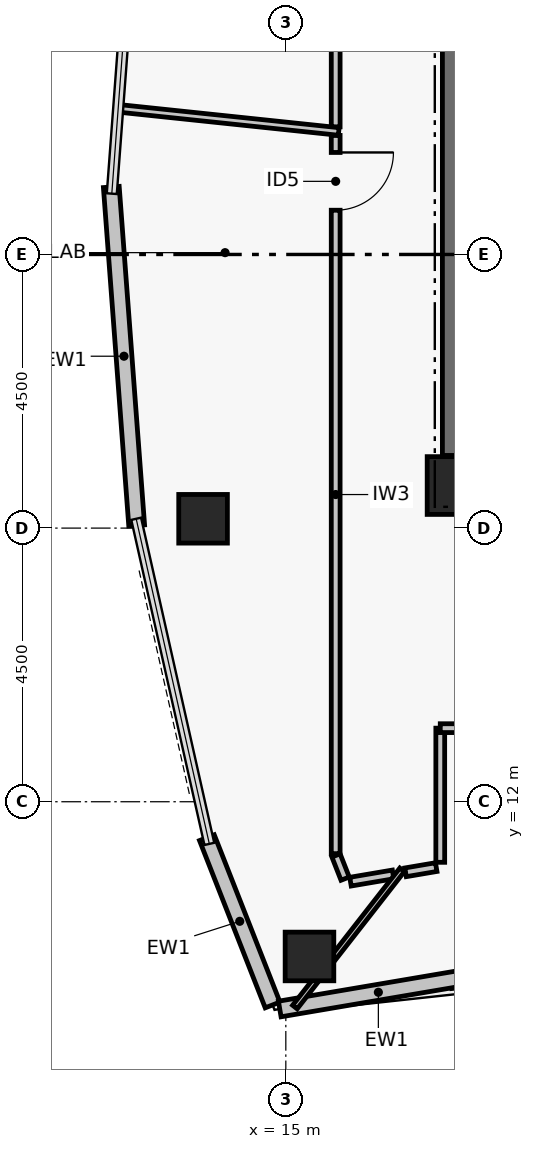
"""IFC4 building model, lengths in metres.
Left out: names, types, materials, properties, quantities, classifications, styles, units other than length and angle.
Written with IfcOpenShell. Run it as: python <this file> out.ifc"""

import sys

from ifc_helpers import new_model, si_unit, direction, frame, frame_2d, origin, origin_2d, place, context, subcontext, project, spatial, rectangle, hollow_rectangle, extrude, element, fill, save


model = new_model("IFC4")
c1 = context("Model", 3, precision=1e-05, world=origin(), true_north=direction((0.0, 1.0)))
c2 = subcontext(c1, "Body", "Model", "MODEL_VIEW")
j1 = project(units=[si_unit("LENGTHUNIT", "METRE"), si_unit("PLANEANGLEUNIT", "RADIAN")], contexts=[c1])
p1 = place(None, origin())
s1 = spatial("IfcSite", under=j1, at=p1, CompositionType="ELEMENT")
p2 = place(p1, origin())
s2 = spatial("IfcBuilding", under=s1, at=p2, CompositionType="ELEMENT")
p3 = place(p2, frame((0.0, 0.0, 247.14)))
s3 = spatial("IfcBuildingStorey", under=s2, at=p3, CompositionType="ELEMENT", Elevation=247.14)
p4 = place(p3, frame((17.8, 17.2, 0.0), z_axis=(0.0, 0.0, 1.0), x_axis=(1.0, 0.0, 0.0)))
e1 = element("IfcColumn", 1, at=p4, inside=s3, PredefinedType="COLUMN", context=c2, shape_type="SweptSolid", body=[
    extrude(rectangle(XDim=0.95, YDim=0.95, at=origin_2d()), origin(), (0.0, 0.0, 1.0), 3.72),
])
p5 = place(p3, frame((17.8, 17.695, 0.0), z_axis=(0.0, 0.0, 1.0), x_axis=(0.0, 1.0, 0.0)))
e2 = element("IfcWall", 2, at=p5, inside=s3, PredefinedType="SHEAR", context=c2, shape_type="SweptSolid", body=[
    extrude(rectangle(XDim=8.61, YDim=0.45, at=frame_2d((4.305, 0.0))), origin(), (0.0, 0.0, 1.0), 3.5),
])
for number, where, z_axis, x_axis in (
    (3, (13.639, 16.653, 0.0), (0.0, 0.0, 1.0), (1.0, 0.0, 0.0)),
    (4, (15.389, 9.455, 0.0), (0.0, 0.0, 1.0), (1.0, 0.0, 0.0)),
):
    element("IfcColumn", number, at=place(p3, frame(where, z_axis=z_axis, x_axis=x_axis)), inside=s3, PredefinedType="COLUMN", context=c2, shape_type="SweptSolid", body=[
        extrude(hollow_rectangle(XDim=0.8, YDim=0.8, WallThickness=0.035, at=origin_2d()), origin(), (0.0, 0.0, 1.0), 3.72),
    ])
p6 = place(p3, frame((12.547, 16.544, 0.0), z_axis=(0.0, 0.0, 1.0), x_axis=(-0.074752976501, 0.99720208208, 0.0)))
e5 = element("IfcWall", 5, at=p6, inside=s3, PredefinedType="PARTITIONING", context=c2, shape_type="SweptSolid", body=[
    extrude(rectangle(XDim=5.582, YDim=0.26, at=frame_2d((2.791, 0.0))), origin(), (0.0, 0.0, 1.0), 3.5),
])
p7 = place(p3, frame((14.782, 8.658, 0.0), z_axis=(0.0, 0.0, 1.0), x_axis=(-0.365529693114, 0.930799679551, 0.0)))
e6 = element("IfcWall", 6, at=p7, inside=s3, PredefinedType="PARTITIONING", context=c2, shape_type="SweptSolid", body=[
    extrude(rectangle(XDim=2.956, YDim=0.26, at=frame_2d((1.478, 0.0))), origin(), (0.0, 0.0, 1.0), 3.5),
])
p8 = place(p3, frame((18.144, 9.142, 0.0), z_axis=(0.0, 0.0, 1.0), x_axis=(-0.985885871317, -0.167418782513, 0.0)))
e7 = element("IfcWall", 7, at=p8, inside=s3, PredefinedType="PARTITIONING", context=c2, shape_type="SweptSolid", body=[
    extrude(rectangle(XDim=3.29, YDim=0.26, at=frame_2d((1.645, 0.0))), origin(), (0.0, 0.0, 1.0), 3.5),
])
p9 = place(p3, frame((15.82, 22.958, 0.0), z_axis=(0.0, 0.0, 1.0), x_axis=(0.0, -1.0, 0.0)))
e8 = element("IfcWall", 8, at=p9, inside=s3, PredefinedType="PARTITIONING", context=c2, shape_type="SweptSolid", body=[
    extrude(rectangle(XDim=11.811, YDim=0.145, at=frame_2d((5.906, 0.0))), origin(), (0.0, 0.0, 1.0), 2.78),
])
p10 = place(p9, frame((0.28, 0.0, 0.0)))
e9 = element("IfcOpeningElement", 9, at=p10, cuts=e8, PredefinedType="OPENING", context=c2, shape_type="SweptSolid", body=[
    extrude(rectangle(XDim=0.95, YDim=2.06, at=frame_2d((0.475, 1.03))), frame((0.0, 0.083, 0.0), z_axis=(0.0, -1.0, 0.0), x_axis=(1.0, 0.0, 0.0)), (0.0, 0.0, 1.0), 0.165),
])
p11 = place(p3, frame((15.825, 11.117, 0.0), z_axis=(0.0, 0.0, 1.0), x_axis=(0.365633948196, -0.930758731319, 0.0)))
e10 = element("IfcWall", 10, at=p11, inside=s3, PredefinedType="PARTITIONING", context=c2, shape_type="SweptSolid", body=[
    extrude(rectangle(XDim=0.41, YDim=0.145, at=frame_2d((0.205, 0.0))), origin(), (0.0, 0.0, 1.0), 2.78),
])
p12 = place(p3, frame((16.063, 10.686, 0.0), z_axis=(0.0, 0.0, 1.0), x_axis=(0.985869455419, 0.167515422787, 0.0)))
e11 = element("IfcWall", 11, at=p12, inside=s3, PredefinedType="PARTITIONING", context=c2, shape_type="SweptSolid", body=[
    extrude(rectangle(XDim=0.711, YDim=0.145, at=frame_2d((0.355, 0.0))), origin(), (0.0, 0.0, 1.0), 3.13),
])
p13 = place(p3, frame((16.969, 10.839, 0.0), z_axis=(0.0, 0.0, 1.0), x_axis=(0.985873186984, 0.167493460131, 0.0)))
e12 = element("IfcWall", 12, at=p13, inside=s3, PredefinedType="PARTITIONING", context=c2, shape_type="SweptSolid", body=[
    extrude(rectangle(XDim=0.512, YDim=0.145, at=frame_2d((0.256, 0.0))), origin(), (0.0, 0.0, 1.0), 3.5),
])
p14 = place(p3, frame((17.54, 11.004, 0.0), z_axis=(0.0, 0.0, 1.0), x_axis=(0.0, 1.0, 0.0)))
e13 = element("IfcWall", 13, at=p14, inside=s3, PredefinedType="PARTITIONING", context=c2, shape_type="SweptSolid", body=[
    extrude(rectangle(XDim=2.206, YDim=0.145, at=frame_2d((1.103, 0.0))), origin(), (0.0, 0.0, 1.0), 3.13),
])
p15 = place(p3, frame((17.54, 13.21, 0.0), z_axis=(0.0, 0.0, 1.0), x_axis=(1.0, 0.0, 0.0)))
e14 = element("IfcWall", 14, at=p15, inside=s3, PredefinedType="PARTITIONING", context=c2, shape_type="SweptSolid", body=[
    extrude(rectangle(XDim=11.57, YDim=0.145, at=frame_2d((5.785, 0.0))), origin(), (0.0, 0.0, 1.0), 2.78),
])
p16 = place(p15, frame((1.538, 0.0, 0.0)))
e15 = element("IfcOpeningElement", 15, at=p16, cuts=e14, PredefinedType="OPENING", context=c2, shape_type="SweptSolid", body=[
    extrude(rectangle(XDim=0.95, YDim=2.06, at=frame_2d((0.475, 1.03))), frame((0.0, 0.083, 0.0), z_axis=(0.0, -1.0, 0.0), x_axis=(1.0, 0.0, 0.0)), (0.0, 0.0, 1.0), 0.165),
])
p17 = place(p3, frame((15.82, 32.854, 0.0), z_axis=(0.0, 0.0, 1.0), x_axis=(0.0, -1.0, 0.0)))
e16 = element("IfcWall", 16, at=p17, inside=s3, PredefinedType="PARTITIONING", context=c2, shape_type="SweptSolid", body=[
    extrude(rectangle(XDim=9.755, YDim=0.145, at=frame_2d((4.878, 0.0))), origin(), (0.0, 0.0, 1.0), 2.78),
])
p18 = place(p3, frame((15.87, 23.023, 0.0), z_axis=(0.0, 0.0, 1.0), x_axis=(-0.994526285713, 0.104486683482, 0.0)))
e17 = element("IfcWall", 17, at=p18, inside=s3, PredefinedType="PARTITIONING", context=c2, shape_type="SweptSolid", body=[
    extrude(rectangle(XDim=3.657, YDim=0.125, at=frame_2d((1.828, 0.0))), origin(), (0.0, 0.0, 1.0), 2.98),
])
p19 = place(p3, frame((16.913, 10.881, 0.0), z_axis=(0.0, 0.0, 1.0), x_axis=(-0.615662236592, -0.788010158839, 0.0)))
e18 = element("IfcWall", 18, at=p19, inside=s3, PredefinedType="PARTITIONING", context=c2, shape_type="SweptSolid", body=[
    extrude(rectangle(XDim=2.864, YDim=0.095, at=frame_2d((1.432, 0.0))), origin(), (0.0, 0.0, 1.0), 2.98),
])
p20 = place(p10, origin())
e19 = element("IfcDoor", 19, at=p20, inside=s3, OperationType="SINGLE_SWING_LEFT", PredefinedType="DOOR", context=c2, shape_type="SweptSolid", body=[
    extrude(rectangle(XDim=0.95, YDim=2.06, at=frame_2d((0.475, 1.03))), frame((0.0, 0.025, 0.0), z_axis=(0.0, -1.0, 0.0), x_axis=(1.0, 0.0, 0.0)), (0.0, 0.0, 1.0), 0.05),
])
fill(e9, e19)
save(model, sys.argv[1])
